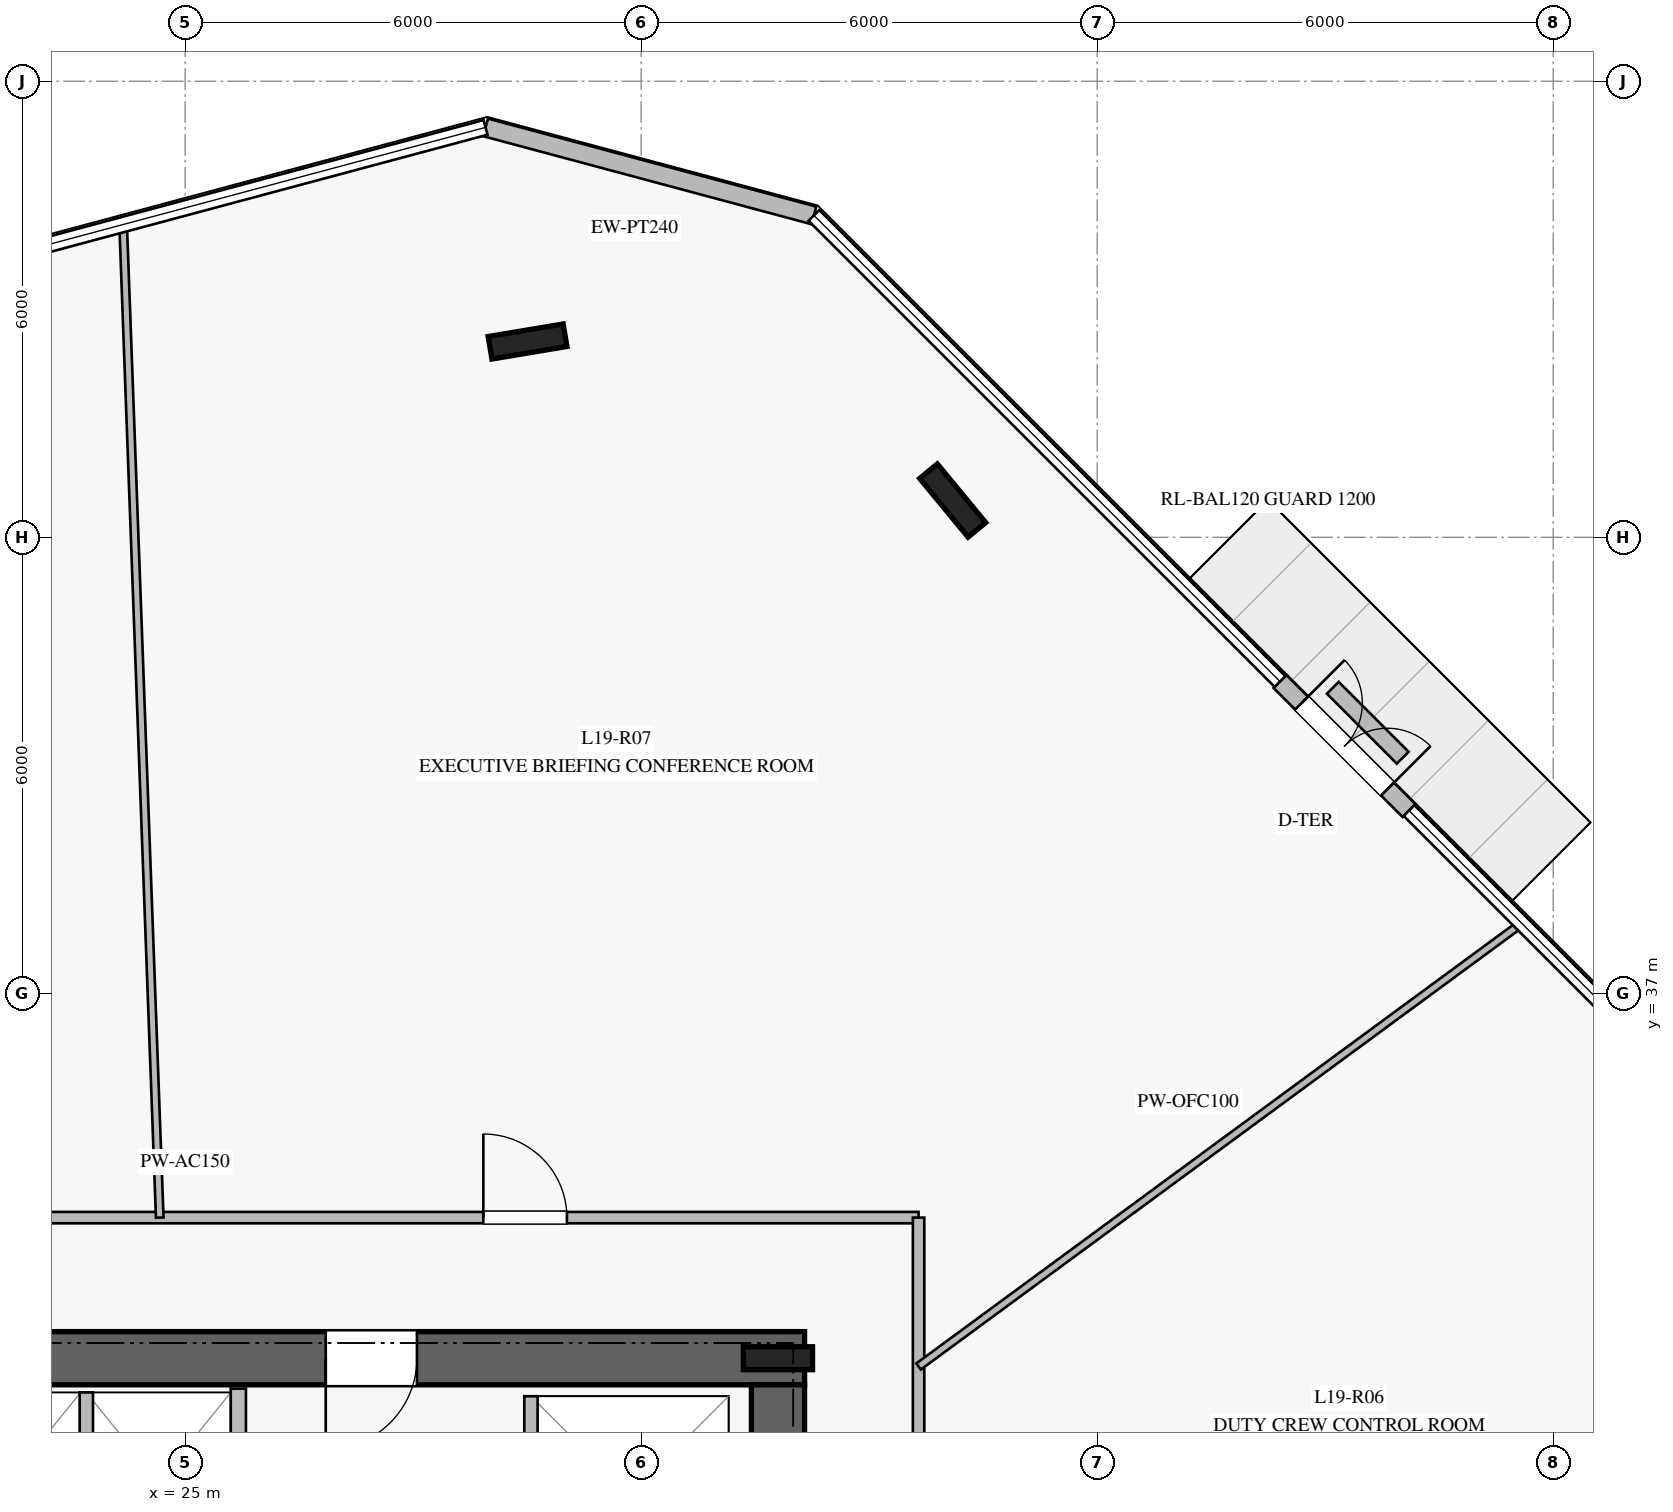
"""IFC4 building model, lengths in metres.
Left out: names, types, materials, properties, quantities, classifications, styles, units other than length and angle.
Written with IfcOpenShell. Run it as: python <this file> out.ifc"""

import sys

from ifc_helpers import new_model, si_unit, direction, frame, frame_2d, origin, origin_2d, place, context, subcontext, project, spatial, rectangle, i_section, extrude, element, fill, save


model = new_model("IFC4")
c1 = context("Model", 3, precision=1e-05, world=origin(), true_north=direction((0.0, 1.0)))
c2 = subcontext(c1, "Body", "Model", "MODEL_VIEW")
j1 = project(units=[si_unit("LENGTHUNIT", "METRE"), si_unit("PLANEANGLEUNIT", "RADIAN")], contexts=[c1])
p1 = place(None, origin())
s1 = spatial("IfcSite", under=j1, at=p1, CompositionType="ELEMENT")
p2 = place(p1, origin())
s2 = spatial("IfcBuilding", under=s1, at=p2, CompositionType="ELEMENT")
p3 = place(p2, frame((0.0, 0.0, 80.0)))
s3 = spatial("IfcBuildingStorey", under=s2, at=p3, CompositionType="ELEMENT", Elevation=80.0)
p4 = place(p3, frame((33.15, 32.2, 0.0), z_axis=(0.0, 0.0, 1.0), x_axis=(-1.0, 0.0, 0.0)))
e1 = element("IfcWall", 1, at=p4, inside=s3, PredefinedType="SHEAR", context=c2, shape_type="SweptSolid", body=[
    extrude(rectangle(XDim=16.3, YDim=0.7, at=frame_2d((8.15, 0.0))), origin(), (0.0, 0.0, 1.0), 3.76),
])
p5 = place(p4, frame((5.1, 0.0, 0.0)))
e2 = element("IfcOpeningElement", 2, at=p5, cuts=e1, PredefinedType="OPENING", context=c2, shape_type="SweptSolid", body=[
    extrude(rectangle(XDim=1.2, YDim=2.25, at=frame_2d((0.6, 1.125))), frame((0.0, 0.36, 0.0), z_axis=(0.0, -1.0, 0.0), x_axis=(1.0, 0.0, 0.0)), (0.0, 0.0, 1.0), 0.72),
])
p6 = place(p3, frame((32.8, 18.15, 0.0), z_axis=(0.0, 0.0, 1.0), x_axis=(0.0, 1.0, 0.0)))
e3 = element("IfcWall", 3, at=p6, inside=s3, PredefinedType="SHEAR", context=c2, shape_type="SweptSolid", body=[
    extrude(rectangle(XDim=13.7, YDim=0.7, at=frame_2d((6.85, 0.0))), origin(), (0.0, 0.0, 1.0), 3.76),
])
p7 = place(p3, frame((32.8, 32.2, 0.0), z_axis=(0.0, 0.0, 1.0), x_axis=(1.0, 0.0, 0.0)))
e4 = element("IfcColumn", 4, at=p7, inside=s3, PredefinedType="COLUMN", context=c2, shape_type="SweptSolid", body=[
    extrude(i_section(OverallWidth=0.302, OverallDepth=0.91, WebThickness=0.021, FlangeThickness=0.04, at=origin_2d()), origin(), (0.0, 0.0, 1.0), 4.0),
])
for number, where, z_axis, x_axis in (
    (5, (35.099, 43.484, 0.0), (0.0, 0.0, 1.0), (-0.636, 0.772, 0.0)),
    (6, (29.505, 45.576, 0.0), (0.0, 0.0, 1.0), (0.986, 0.165, 0.0)),
):
    element("IfcColumn", number, at=place(p3, frame(where, z_axis=z_axis, x_axis=x_axis)), inside=s3, PredefinedType="COLUMN", context=c2, shape_type="SweptSolid", body=[
        extrude(i_section(OverallWidth=0.3, OverallDepth=1.0, WebThickness=0.019, FlangeThickness=0.036, at=origin_2d()), origin(), (0.0, 0.0, 1.0), 4.0),
    ])
p8 = place(p3, frame((41.103, 39.405, 0.0), z_axis=(0.0, 0.0, 1.0), x_axis=(-0.707106781187, 0.707106781187, 0.0)))
e7 = element("IfcWall", 7, at=p8, inside=s3, PredefinedType="STANDARD", context=c2, shape_type="SweptSolid", body=[
    extrude(rectangle(XDim=2.401, YDim=0.24, at=frame_2d((1.201, 0.0))), origin(), (0.0, 0.0, 1.0), 3.76),
])
p9 = place(p8, frame((0.4, 0.0, 0.0)))
e8 = element("IfcOpeningElement", 8, at=p9, cuts=e7, PredefinedType="OPENING", context=c2, shape_type="SweptSolid", body=[
    extrude(rectangle(XDim=1.6, YDim=2.25, at=frame_2d((0.8, 1.125))), frame((0.0, 0.13, 0.0), z_axis=(0.0, -1.0, 0.0), x_axis=(1.0, 0.0, 0.0)), (0.0, 0.0, 1.0), 0.26),
])
p10 = place(p3, frame((33.273, 47.235, 0.0), z_axis=(0.0, 0.0, 1.0), x_axis=(-0.965903455427, 0.258902519869, 0.0)))
e9 = element("IfcWall", 9, at=p10, inside=s3, PredefinedType="STANDARD", context=c2, shape_type="SweptSolid", body=[
    extrude(rectangle(XDim=4.473, YDim=0.24, at=frame_2d((2.236, 0.0))), origin(), (0.0, 0.0, 1.0), 3.76),
])
p11 = place(p3, frame((41.02, 40.1, 0.0), z_axis=(0.0, 0.0, 1.0), x_axis=(-0.707106781187, 0.707106781187, 0.0)))
e10 = element("IfcWall", 10, at=p11, inside=s3, PredefinedType="USERDEFINED", context=c2, shape_type="SweptSolid", body=[
    extrude(rectangle(XDim=1.301, YDim=0.22, at=frame_2d((0.65, 0.0))), origin(), (0.0, 0.0, 1.0), 0.4),
])
p12 = place(p3, frame((25.7, 26.65, 0.0), z_axis=(0.0, 0.0, 1.0), x_axis=(0.0, 1.0, 0.0)))
e11 = element("IfcWall", 11, at=p12, inside=s3, PredefinedType="PARTITIONING", context=c2, shape_type="SweptSolid", body=[
    extrude(rectangle(XDim=5.15, YDim=0.2, at=frame_2d((2.575, 0.0))), origin(), (0.0, 0.0, 1.0), 3.76),
])
p13 = place(p3, frame((23.7, 29.4, 0.0), z_axis=(0.0, 0.0, 1.0), x_axis=(0.0, 1.0, 0.0)))
e12 = element("IfcWall", 12, at=p13, inside=s3, PredefinedType="PARTITIONING", context=c2, shape_type="SweptSolid", body=[
    extrude(rectangle(XDim=2.35, YDim=0.175, at=frame_2d((1.175, 0.0))), origin(), (0.0, 0.0, 1.0), 3.76),
])
p14 = place(p3, frame((29.55, 29.1, 0.0), z_axis=(0.0, 0.0, 1.0), x_axis=(0.0, 1.0, 0.0)))
e13 = element("IfcWall", 13, at=p14, inside=s3, PredefinedType="PARTITIONING", context=c2, shape_type="SweptSolid", body=[
    extrude(rectangle(XDim=2.6, YDim=0.175, at=frame_2d((1.3, 0.0))), origin(), (0.0, 0.0, 1.0), 3.76),
])
p15 = place(p14, frame((0.7, 0.0, 0.0)))
e14 = element("IfcOpeningElement", 14, at=p15, cuts=e13, PredefinedType="OPENING", context=c2, shape_type="SweptSolid", body=[
    extrude(rectangle(XDim=1.2, YDim=2.2, at=frame_2d((0.6, 1.1))), frame((0.0, 0.098, 0.0), z_axis=(0.0, -1.0, 0.0), x_axis=(1.0, 0.0, 0.0)), (0.0, 0.0, 1.0), 0.195),
])
p16 = place(p3, frame((15.35, 34.05, 0.0), z_axis=(0.0, 0.0, 1.0), x_axis=(1.0, 0.0, 0.0)))
e15 = element("IfcWall", 15, at=p16, inside=s3, PredefinedType="PARTITIONING", context=c2, shape_type="SweptSolid", body=[
    extrude(rectangle(XDim=19.3, YDim=0.15, at=frame_2d((9.65, 0.0))), origin(), (0.0, 0.0, 1.0), 3.21),
])
p17 = place(p16, frame((13.573, 0.0, 0.0)))
e16 = element("IfcOpeningElement", 16, at=p17, cuts=e15, PredefinedType="OPENING", context=c2, shape_type="SweptSolid", body=[
    extrude(rectangle(XDim=1.1, YDim=2.2, at=frame_2d((0.55, 1.1))), frame((0.0, 0.085, 0.0), z_axis=(0.0, -1.0, 0.0), x_axis=(1.0, 0.0, 0.0)), (0.0, 0.0, 1.0), 0.17),
])
p18 = place(p16, frame((5.066, 0.0, 0.0)))
e17 = element("IfcOpeningElement", 17, at=p18, cuts=e15, PredefinedType="OPENING", context=c2, shape_type="SweptSolid", body=[
    extrude(rectangle(XDim=1.1, YDim=2.2, at=frame_2d((0.55, 1.1))), frame((0.0, 0.085, 0.0), z_axis=(0.0, -1.0, 0.0), x_axis=(1.0, 0.0, 0.0)), (0.0, 0.0, 1.0), 0.17),
])
p19 = place(p3, frame((34.65, 34.05, 0.0), z_axis=(0.0, 0.0, 1.0), x_axis=(0.0, -1.0, 0.0)))
e18 = element("IfcWall", 18, at=p19, inside=s3, PredefinedType="PARTITIONING", context=c2, shape_type="SweptSolid", body=[
    extrude(rectangle(XDim=18.1, YDim=0.15, at=frame_2d((9.05, 0.0))), origin(), (0.0, 0.0, 1.0), 3.21),
])
p20 = place(p19, frame((15.416, 0.0, 0.0)))
e19 = element("IfcOpeningElement", 19, at=p20, cuts=e18, PredefinedType="OPENING", context=c2, shape_type="SweptSolid", body=[
    extrude(rectangle(XDim=1.1, YDim=2.2, at=frame_2d((0.55, 1.1))), frame((0.0, 0.085, 0.0), z_axis=(0.0, -1.0, 0.0), x_axis=(1.0, 0.0, 0.0)), (0.0, 0.0, 1.0), 0.17),
])
p21 = place(p19, frame((10.251, 0.0, 0.0)))
e20 = element("IfcOpeningElement", 20, at=p21, cuts=e18, PredefinedType="OPENING", context=c2, shape_type="SweptSolid", body=[
    extrude(rectangle(XDim=1.1, YDim=2.2, at=frame_2d((0.55, 1.1))), frame((0.0, 0.085, 0.0), z_axis=(0.0, -1.0, 0.0), x_axis=(1.0, 0.0, 0.0)), (0.0, 0.0, 1.0), 0.17),
])
p22 = place(p19, frame((4.014, 0.0, 0.0)))
e21 = element("IfcOpeningElement", 21, at=p22, cuts=e18, PredefinedType="OPENING", context=c2, shape_type="SweptSolid", body=[
    extrude(rectangle(XDim=1.1, YDim=2.2, at=frame_2d((0.55, 1.1))), frame((0.0, 0.085, 0.0), z_axis=(0.0, -1.0, 0.0), x_axis=(1.0, 0.0, 0.0)), (0.0, 0.0, 1.0), 0.17),
])
p23 = place(p3, frame((34.65, 32.091, 0.0), z_axis=(0.0, 0.0, 1.0), x_axis=(0.805812397502, 0.592170904412, 0.0)))
e22 = element("IfcWall", 22, at=p23, inside=s3, PredefinedType="MOVABLE", context=c2, shape_type="SweptSolid", body=[
    extrude(rectangle(XDim=9.83, YDim=0.1, at=frame_2d((4.915, 0.0))), origin(), (0.0, 0.0, 1.0), 3.05),
])
p24 = place(p3, frame((24.666, 34.05, 0.0), z_axis=(0.0, 0.0, 1.0), x_axis=(-0.03683875017, 0.999321222874, 0.0)))
e23 = element("IfcWall", 23, at=p24, inside=s3, PredefinedType="MOVABLE", context=c2, shape_type="SweptSolid", body=[
    extrude(rectangle(XDim=13.056, YDim=0.1, at=frame_2d((6.528, 0.0))), origin(), (0.0, 0.0, 1.0), 3.06),
])
p25 = place(p9, frame((1.6, 0.0, 0.0), z_axis=(0.0, 0.0, 1.0), x_axis=(-1.0, 0.0, 0.0)))
e24 = element("IfcDoor", 24, at=p25, inside=s3, OperationType="DOUBLE_DOOR_SINGLE_SWING", PredefinedType="DOOR", context=c2, shape_type="SweptSolid", body=[
    extrude(rectangle(XDim=1.6, YDim=2.25, at=frame_2d((0.8, 1.125))), frame((0.0, 0.025, 0.0), z_axis=(0.0, -1.0, 0.0), x_axis=(1.0, 0.0, 0.0)), (0.0, 0.0, 1.0), 0.05),
])
fill(e8, e24)
p26 = place(p5, origin())
e25 = element("IfcDoor", 25, at=p26, inside=s3, OperationType="SINGLE_SWING_RIGHT", PredefinedType="DOOR", context=c2, shape_type="SweptSolid", body=[
    extrude(rectangle(XDim=1.2, YDim=2.25, at=frame_2d((0.6, 1.125))), frame((0.0, 0.025, 0.0), z_axis=(0.0, -1.0, 0.0), x_axis=(1.0, 0.0, 0.0)), (0.0, 0.0, 1.0), 0.05),
])
fill(e2, e25)
p27 = place(p17, origin())
e26 = element("IfcDoor", 26, at=p27, inside=s3, OperationType="SINGLE_SWING_LEFT", PredefinedType="DOOR", context=c2, shape_type="SweptSolid", body=[
    extrude(rectangle(XDim=1.1, YDim=2.2, at=frame_2d((0.55, 1.1))), frame((0.0, 0.025, 0.0), z_axis=(0.0, -1.0, 0.0), x_axis=(1.0, 0.0, 0.0)), (0.0, 0.0, 1.0), 0.05),
])
fill(e16, e26)
save(model, sys.argv[1])
